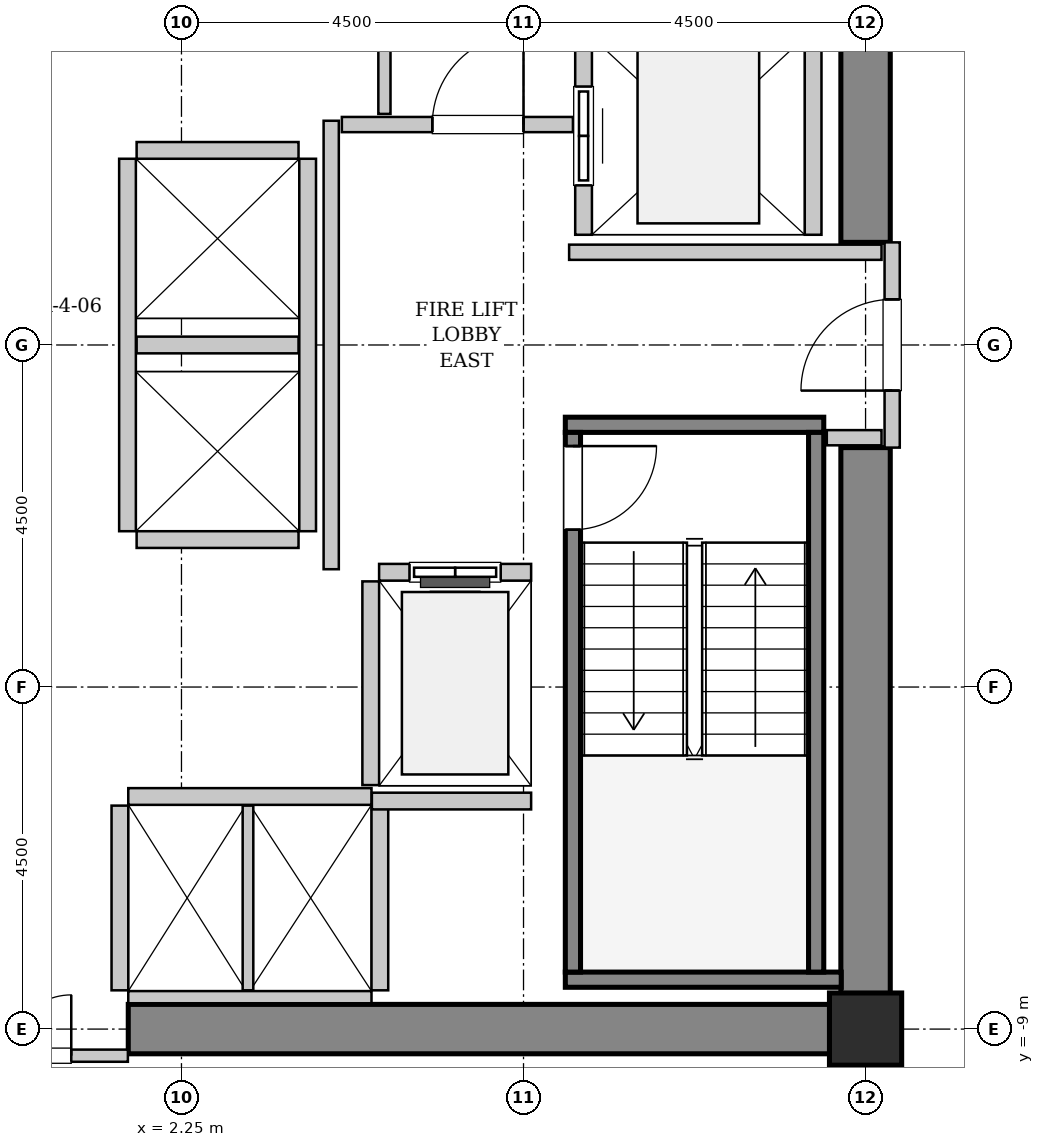
"""IFC4 building model, lengths in metres.
Left out: names, types, materials, properties, quantities, classifications, styles, units other than length and angle.
Written with IfcOpenShell. Run it as: python <this file> out.ifc"""

import sys

from ifc_helpers import new_model, si_unit, direction, frame, frame_2d, origin, origin_2d, place, context, subcontext, project, spatial, rectangle, hollow_rectangle, extrude, source, transform, mapped, element, fill, save


model = new_model("IFC4")
c1 = context("Model", 3, precision=1e-05, world=origin(), true_north=direction((0.0, 1.0)))
c2 = subcontext(c1, "Body", "Model", "MODEL_VIEW")
j1 = project(units=[si_unit("LENGTHUNIT", "METRE"), si_unit("PLANEANGLEUNIT", "RADIAN")], contexts=[c1])
p1 = place(None, origin())
s1 = spatial("IfcSite", under=j1, at=p1, CompositionType="ELEMENT")
p2 = place(p1, origin())
s2 = spatial("IfcBuilding", under=s1, at=p2, CompositionType="ELEMENT")
p3 = place(p2, frame((0.0, 0.0, 48.2)))
s3 = spatial("IfcBuildingStorey", under=s2, at=p3, CompositionType="ELEMENT", Elevation=48.2)
m1 = source(origin(), c2, "Body", "SweptSolid", [
    extrude(rectangle(XDim=10.025, YDim=0.65, at=frame_2d((5.012, 0.0))), origin(), (0.0, 0.0, 1.0), 3.8),
])
p4 = place(p3, frame((1.55, -9.0, 0.0), z_axis=(0.0, 0.0, 1.0), x_axis=(1.0, 0.0, 0.0)))
e1 = element("IfcWall", 1, at=p4, inside=s3, PredefinedType="SHEAR", context=c2, shape_type="MappedRepresentation", body=[
    mapped(m1, transform((0.0, 0.0, 0.0), x_axis=(1.0, 0.0, 0.0), y_axis=(0.0, 1.0, 0.0), z_axis=(0.0, 0.0, 1.0), scale=1.0)),
])
m2 = source(origin(), c2, "Body", "SweptSolid", [
    extrude(rectangle(XDim=7.325, YDim=0.65, at=frame_2d((3.663, 0.0))), origin(), (0.0, 0.0, 1.0), 3.8),
])
for number, where, z_axis, x_axis in (
    (2, (11.25, -8.675, 0.0), (0.0, 0.0, 1.0), (0.0, 1.0, 0.0)),
    (3, (11.25, 1.35, 0.0), (0.0, 0.0, 1.0), (0.0, 1.0, 0.0)),
):
    element("IfcWall", number, at=place(p3, frame(where, z_axis=z_axis, x_axis=x_axis)), inside=s3, PredefinedType="SHEAR", context=c2, shape_type="MappedRepresentation", body=[
        mapped(m2, transform((0.0, 0.0, 0.0), x_axis=(1.0, 0.0, 0.0), y_axis=(0.0, 1.0, 0.0), z_axis=(0.0, 0.0, 1.0), scale=1.0)),
    ])
m3 = source(origin(), c2, "Body", "SweptSolid", [
    extrude(hollow_rectangle(XDim=0.95, YDim=0.95, WallThickness=0.045, InnerFilletRadius=0.045, OuterFilletRadius=0.09, at=origin_2d()), origin(), (0.0, 0.0, 1.0), 3.8),
])
p5 = place(p3, frame((11.25, -9.0, 0.0), z_axis=(0.0, 0.0, 1.0), x_axis=(1.0, 0.0, 0.0)))
e4 = element("IfcColumn", 4, at=p5, inside=s3, PredefinedType="COLUMN", context=c2, shape_type="MappedRepresentation", body=[
    mapped(m3, transform((0.0, 0.0, 0.0), x_axis=(1.0, 0.0, 0.0), y_axis=(0.0, 1.0, 0.0), z_axis=(0.0, 0.0, 1.0), scale=1.0)),
])
m4 = source(origin(), c2, "Body", "SweptSolid", [
    extrude(rectangle(XDim=3.4, YDim=0.2, at=frame_2d((1.7, 0.0))), origin(), (0.0, 0.0, 1.0), 3.8),
])
p6 = place(p3, frame((7.3, -1.05, 0.0), z_axis=(0.0, 0.0, 1.0), x_axis=(1.0, 0.0, 0.0)))
e5 = element("IfcWall", 5, at=p6, inside=s3, PredefinedType="SOLIDWALL", context=c2, shape_type="MappedRepresentation", body=[
    mapped(m4, transform((0.0, 0.0, 0.0), x_axis=(1.0, 0.0, 0.0), y_axis=(0.0, 1.0, 0.0), z_axis=(0.0, 0.0, 1.0), scale=1.0)),
])
m5 = source(origin(), c2, "Body", "SweptSolid", [
    extrude(rectangle(XDim=3.63, YDim=0.2, at=frame_2d((1.815, 0.0))), origin(), (0.0, 0.0, 1.0), 3.8),
])
p7 = place(p3, frame((7.3, -8.35, 0.0), z_axis=(0.0, 0.0, 1.0), x_axis=(1.0, 0.0, 0.0)))
e6 = element("IfcWall", 6, at=p7, inside=s3, PredefinedType="SOLIDWALL", context=c2, shape_type="MappedRepresentation", body=[
    mapped(m5, transform((0.0, 0.0, 0.0), x_axis=(1.0, 0.0, 0.0), y_axis=(0.0, 1.0, 0.0), z_axis=(0.0, 0.0, 1.0), scale=1.0)),
])
m6 = source(origin(), c2, "Body", "SweptSolid", [
    extrude(rectangle(XDim=7.1, YDim=0.2, at=frame_2d((3.55, 0.0))), origin(), (0.0, 0.0, 1.0), 3.8),
])
p8 = place(p3, frame((7.4, -1.15, 0.0), z_axis=(0.0, 0.0, 1.0), x_axis=(0.0, -1.0, 0.0)))
e7 = element("IfcWall", 7, at=p8, inside=s3, PredefinedType="SOLIDWALL", context=c2, shape_type="MappedRepresentation", body=[
    mapped(m6, transform((0.0, 0.0, 0.0), x_axis=(1.0, 0.0, 0.0), y_axis=(0.0, 1.0, 0.0), z_axis=(0.0, 0.0, 1.0), scale=1.0)),
])
p9 = place(p8, frame((0.18, 0.0, 0.0)))
e8 = element("IfcOpeningElement", 8, at=p9, cuts=e7, PredefinedType="OPENING", context=c2, shape_type="SweptSolid", body=[
    extrude(rectangle(XDim=1.1, YDim=2.15, at=frame_2d((0.55, 1.075))), frame((0.0, 0.11, 0.0), z_axis=(0.0, -1.0, 0.0), x_axis=(1.0, 0.0, 0.0)), (0.0, 0.0, 1.0), 0.22),
])
p10 = place(p3, frame((10.6, -1.15, 0.0), z_axis=(0.0, 0.0, 1.0), x_axis=(0.0, -1.0, 0.0)))
e9 = element("IfcWall", 9, at=p10, inside=s3, PredefinedType="SOLIDWALL", context=c2, shape_type="MappedRepresentation", body=[
    mapped(m6, transform((0.0, 0.0, 0.0), x_axis=(1.0, 0.0, 0.0), y_axis=(0.0, 1.0, 0.0), z_axis=(0.0, 0.0, 1.0), scale=1.0)),
])
m7 = source(origin(), c2, "Body", "SweptSolid", [
    extrude(rectangle(XDim=2.0, YDim=0.22, at=frame_2d((1.0, 0.0))), origin(), (0.0, 0.0, 1.0), 3.535),
])
p11 = place(p3, frame((6.85, -2.99, 0.0), z_axis=(0.0, 0.0, 1.0), x_axis=(-1.0, 0.0, 0.0)))
e10 = element("IfcWall", 10, at=p11, inside=s3, PredefinedType="SOLIDWALL", context=c2, shape_type="MappedRepresentation", body=[
    mapped(m7, transform((0.0, 0.0, 0.0), x_axis=(1.0, 0.0, 0.0), y_axis=(0.0, 1.0, 0.0), z_axis=(0.0, 0.0, 1.0), scale=1.0)),
])
p12 = place(p11, frame((0.4, 0.0, 0.0)))
e11 = element("IfcOpeningElement", 11, at=p12, cuts=e10, PredefinedType="OPENING", context=c2, shape_type="SweptSolid", body=[
    extrude(rectangle(XDim=1.2, YDim=2.2, at=frame_2d((0.6, 1.1))), frame((0.0, 0.12, 0.0), z_axis=(0.0, -1.0, 0.0), x_axis=(1.0, 0.0, 0.0)), (0.0, 0.0, 1.0), 0.24),
])
m8 = source(origin(), c2, "Body", "SweptSolid", [
    extrude(rectangle(XDim=2.68, YDim=0.22, at=frame_2d((1.34, 0.0))), origin(), (0.0, 0.0, 1.0), 3.535),
])
p13 = place(p3, frame((4.74, -3.11, 0.0), z_axis=(0.0, 0.0, 1.0), x_axis=(0.0, -1.0, 0.0)))
e12 = element("IfcWall", 12, at=p13, inside=s3, PredefinedType="SOLIDWALL", context=c2, shape_type="MappedRepresentation", body=[
    mapped(m8, transform((0.0, 0.0, 0.0), x_axis=(1.0, 0.0, 0.0), y_axis=(0.0, 1.0, 0.0), z_axis=(0.0, 0.0, 1.0), scale=1.0)),
])
m9 = source(origin(), c2, "Body", "SweptSolid", [
    extrude(rectangle(XDim=5.45, YDim=0.22, at=frame_2d((2.725, 0.0))), origin(), (0.0, 0.0, 1.0), 3.535),
])
p14 = place(p3, frame((7.54, 6.9, 0.0), z_axis=(0.0, 0.0, 1.0), x_axis=(0.0, -1.0, 0.0)))
e13 = element("IfcWall", 13, at=p14, inside=s3, PredefinedType="SOLIDWALL", context=c2, shape_type="MappedRepresentation", body=[
    mapped(m9, transform((0.0, 0.0, 0.0), x_axis=(1.0, 0.0, 0.0), y_axis=(0.0, 1.0, 0.0), z_axis=(0.0, 0.0, 1.0), scale=1.0)),
])
p15 = place(p14, frame((3.5, 0.0, 0.0)))
e14 = element("IfcOpeningElement", 14, at=p15, cuts=e13, PredefinedType="OPENING", context=c2, shape_type="SweptSolid", body=[
    extrude(rectangle(XDim=1.3, YDim=2.3, at=frame_2d((0.65, 1.15))), frame((0.0, 0.12, 0.0), z_axis=(0.0, -1.0, 0.0), x_axis=(1.0, 0.0, 0.0)), (0.0, 0.0, 1.0), 0.24),
])
p16 = place(p14, frame((0.65, 0.0, 0.0)))
e15 = element("IfcOpeningElement", 15, at=p16, cuts=e13, PredefinedType="OPENING", context=c2, shape_type="SweptSolid", body=[
    extrude(rectangle(XDim=1.3, YDim=2.3, at=frame_2d((0.65, 1.15))), frame((0.0, 0.12, 0.0), z_axis=(0.0, -1.0, 0.0), x_axis=(1.0, 0.0, 0.0)), (0.0, 0.0, 1.0), 0.24),
])
p17 = place(p3, frame((10.56, 1.45, 0.0), z_axis=(0.0, 0.0, 1.0), x_axis=(0.0, 1.0, 0.0)))
e16 = element("IfcWall", 16, at=p17, inside=s3, PredefinedType="SOLIDWALL", context=c2, shape_type="MappedRepresentation", body=[
    mapped(m9, transform((0.0, 0.0, 0.0), x_axis=(1.0, 0.0, 0.0), y_axis=(0.0, 1.0, 0.0), z_axis=(0.0, 0.0, 1.0), scale=1.0)),
])
m10 = source(origin(), c2, "Body", "SweptSolid", [
    extrude(rectangle(XDim=3.2, YDim=0.22, at=frame_2d((1.6, 0.0))), origin(), (0.0, 0.0, 1.0), 3.535),
])
p18 = place(p3, frame((4.75, -5.94, 0.0), z_axis=(0.0, 0.0, 1.0), x_axis=(-1.0, 0.0, 0.0)))
e17 = element("IfcWall", 17, at=p18, inside=s3, PredefinedType="SOLIDWALL", context=c2, shape_type="MappedRepresentation", body=[
    mapped(m10, transform((0.0, 0.0, 0.0), x_axis=(1.0, 0.0, 0.0), y_axis=(0.0, 1.0, 0.0), z_axis=(0.0, 0.0, 1.0), scale=1.0)),
])
m11 = source(origin(), c2, "Body", "SweptSolid", [
    extrude(rectangle(XDim=3.2, YDim=0.16, at=frame_2d((1.6, 0.0))), origin(), (0.0, 0.0, 1.0), 2.425),
])
p19 = place(p3, frame((1.55, -8.58, 0.0), z_axis=(0.0, 0.0, 1.0), x_axis=(1.0, 0.0, 0.0)))
e18 = element("IfcWall", 18, at=p19, inside=s3, PredefinedType="PARTITIONING", context=c2, shape_type="MappedRepresentation", body=[
    mapped(m11, transform((0.0, 0.0, 0.0), x_axis=(1.0, 0.0, 0.0), y_axis=(0.0, 1.0, 0.0), z_axis=(0.0, 0.0, 1.0), scale=1.0)),
])
m12 = source(origin(), c2, "Body", "SweptSolid", [
    extrude(rectangle(XDim=2.43, YDim=0.22, at=frame_2d((1.215, 0.0))), origin(), (0.0, 0.0, 1.0), 3.535),
])
p20 = place(p3, frame((1.44, -6.06, 0.0), z_axis=(0.0, 0.0, 1.0), x_axis=(0.0, -1.0, 0.0)))
e19 = element("IfcWall", 19, at=p20, inside=s3, PredefinedType="SOLIDWALL", context=c2, shape_type="MappedRepresentation", body=[
    mapped(m12, transform((0.0, 0.0, 0.0), x_axis=(1.0, 0.0, 0.0), y_axis=(0.0, 1.0, 0.0), z_axis=(0.0, 0.0, 1.0), scale=1.0)),
])
m13 = source(origin(), c2, "Body", "SweptSolid", [
    extrude(rectangle(XDim=2.43, YDim=0.14, at=frame_2d((1.215, 0.0))), origin(), (0.0, 0.0, 1.0), 3.535),
])
p21 = place(p3, frame((3.125, -8.49, 0.0), z_axis=(0.0, 0.0, 1.0), x_axis=(0.0, 1.0, 0.0)))
e20 = element("IfcWall", 20, at=p21, inside=s3, PredefinedType="PARTITIONING", context=c2, shape_type="MappedRepresentation", body=[
    mapped(m13, transform((0.0, 0.0, 0.0), x_axis=(1.0, 0.0, 0.0), y_axis=(0.0, 1.0, 0.0), z_axis=(0.0, 0.0, 1.0), scale=1.0)),
])
p22 = place(p3, frame((4.86, -8.49, 0.0), z_axis=(0.0, 0.0, 1.0), x_axis=(0.0, 1.0, 0.0)))
e21 = element("IfcWall", 21, at=p22, inside=s3, PredefinedType="SOLIDWALL", context=c2, shape_type="MappedRepresentation", body=[
    mapped(m12, transform((0.0, 0.0, 0.0), x_axis=(1.0, 0.0, 0.0), y_axis=(0.0, 1.0, 0.0), z_axis=(0.0, 0.0, 1.0), scale=1.0)),
])
m14 = source(origin(), c2, "Body", "SweptSolid", [
    extrude(rectangle(XDim=4.9, YDim=0.22, at=frame_2d((2.45, 0.0))), origin(), (0.0, 0.0, 1.0), 3.535),
])
for number, where, z_axis, x_axis in (
    (22, (1.54, 2.45, 0.0), (0.0, 0.0, 1.0), (0.0, -1.0, 0.0)),
    (23, (3.91, -2.45, 0.0), (0.0, 0.0, 1.0), (0.0, 1.0, 0.0)),
):
    element("IfcWall", number, at=place(p3, frame(where, z_axis=z_axis, x_axis=x_axis)), inside=s3, PredefinedType="SOLIDWALL", context=c2, shape_type="MappedRepresentation", body=[
        mapped(m14, transform((0.0, 0.0, 0.0), x_axis=(1.0, 0.0, 0.0), y_axis=(0.0, 1.0, 0.0), z_axis=(0.0, 0.0, 1.0), scale=1.0)),
    ])
m15 = source(origin(), c2, "Body", "SweptSolid", [
    extrude(rectangle(XDim=2.13, YDim=0.22, at=frame_2d((1.065, 0.0))), origin(), (0.0, 0.0, 1.0), 3.535),
])
for number, where, z_axis, x_axis in (
    (24, (1.66, -2.56, 0.0), (0.0, 0.0, 1.0), (1.0, 0.0, 0.0)),
    (25, (1.66, 0.0, 0.0), (0.0, 0.0, 1.0), (1.0, 0.0, 0.0)),
    (26, (3.79, 2.56, 0.0), (0.0, 0.0, 1.0), (-1.0, 0.0, 0.0)),
):
    element("IfcWall", number, at=place(p3, frame(where, z_axis=z_axis, x_axis=x_axis)), inside=s3, PredefinedType="SOLIDWALL", context=c2, shape_type="MappedRepresentation", body=[
        mapped(m15, transform((0.0, 0.0, 0.0), x_axis=(1.0, 0.0, 0.0), y_axis=(0.0, 1.0, 0.0), z_axis=(0.0, 0.0, 1.0), scale=1.0)),
    ])
m16 = source(origin(), c2, "Body", "SweptSolid", [
    extrude(rectangle(XDim=2.095, YDim=0.22, at=frame_2d((1.048, 0.0))), origin(), (0.0, 0.0, 1.0), 3.535),
])
p23 = place(p3, frame((4.755, -6.0, 0.0), z_axis=(0.0, 0.0, 1.0), x_axis=(1.0, 0.0, 0.0)))
e27 = element("IfcWall", 27, at=p23, inside=s3, PredefinedType="SOLIDWALL", context=c2, shape_type="MappedRepresentation", body=[
    mapped(m16, transform((0.0, 0.0, 0.0), x_axis=(1.0, 0.0, 0.0), y_axis=(0.0, 1.0, 0.0), z_axis=(0.0, 0.0, 1.0), scale=1.0)),
])
m17 = source(origin(), c2, "Body", "SweptSolid", [
    extrude(rectangle(XDim=2.7, YDim=0.2, at=frame_2d((1.35, 0.0))), origin(), (0.0, 0.0, 1.0), 2.425),
])
p24 = place(p3, frame((11.6, -1.35, 0.0), z_axis=(0.0, 0.0, 1.0), x_axis=(0.0, 1.0, 0.0)))
e28 = element("IfcWall", 28, at=p24, inside=s3, PredefinedType="PARTITIONING", context=c2, shape_type="MappedRepresentation", body=[
    mapped(m17, transform((0.0, 0.0, 0.0), x_axis=(1.0, 0.0, 0.0), y_axis=(0.0, 1.0, 0.0), z_axis=(0.0, 0.0, 1.0), scale=1.0)),
])
p25 = place(p24, frame((0.75, 0.0, 0.0)))
e29 = element("IfcOpeningElement", 29, at=p25, cuts=e28, PredefinedType="OPENING", context=c2, shape_type="SweptSolid", body=[
    extrude(rectangle(XDim=1.2, YDim=2.15, at=frame_2d((0.6, 1.075))), frame((0.0, 0.11, 0.0), z_axis=(0.0, -1.0, 0.0), x_axis=(1.0, 0.0, 0.0)), (0.0, 0.0, 1.0), 0.22),
])
m18 = source(origin(), c2, "Body", "SweptSolid", [
    extrude(rectangle(XDim=5.9, YDim=0.2, at=frame_2d((2.95, 0.0))), origin(), (0.0, 0.0, 1.0), 3.535),
])
p26 = place(p3, frame((4.22, -2.95, 0.0), z_axis=(0.0, 0.0, 1.0), x_axis=(0.0, 1.0, 0.0)))
e30 = element("IfcWall", 30, at=p26, inside=s3, PredefinedType="PARTITIONING", context=c2, shape_type="MappedRepresentation", body=[
    mapped(m18, transform((0.0, 0.0, 0.0), x_axis=(1.0, 0.0, 0.0), y_axis=(0.0, 1.0, 0.0), z_axis=(0.0, 0.0, 1.0), scale=1.0)),
])
m19 = source(origin(), c2, "Body", "SweptSolid", [
    extrude(rectangle(XDim=3.04, YDim=0.2, at=frame_2d((1.52, 0.0))), origin(), (0.0, 0.0, 1.0), 3.535),
])
p27 = place(p3, frame((4.36, 2.9, 0.0), z_axis=(0.0, 0.0, 1.0), x_axis=(1.0, 0.0, 0.0)))
e31 = element("IfcWall", 31, at=p27, inside=s3, PredefinedType="PARTITIONING", context=c2, shape_type="MappedRepresentation", body=[
    mapped(m19, transform((0.0, 0.0, 0.0), x_axis=(1.0, 0.0, 0.0), y_axis=(0.0, 1.0, 0.0), z_axis=(0.0, 0.0, 1.0), scale=1.0)),
])
p28 = place(p27, frame((1.19, 0.0, 0.0)))
e32 = element("IfcOpeningElement", 32, at=p28, cuts=e31, PredefinedType="OPENING", context=c2, shape_type="SweptSolid", body=[
    extrude(rectangle(XDim=1.2, YDim=2.15, at=frame_2d((0.6, 1.075))), frame((0.0, 0.11, 0.0), z_axis=(0.0, -1.0, 0.0), x_axis=(1.0, 0.0, 0.0)), (0.0, 0.0, 1.0), 0.22),
])
m20 = source(origin(), c2, "Body", "SweptSolid", [
    extrude(rectangle(XDim=4.11, YDim=0.2, at=frame_2d((2.055, 0.0))), origin(), (0.0, 0.0, 1.0), 3.535),
])
p29 = place(p3, frame((7.35, 1.22, 0.0), z_axis=(0.0, 0.0, 1.0), x_axis=(1.0, 0.0, 0.0)))
e33 = element("IfcWall", 33, at=p29, inside=s3, PredefinedType="PARTITIONING", context=c2, shape_type="MappedRepresentation", body=[
    mapped(m20, transform((0.0, 0.0, 0.0), x_axis=(1.0, 0.0, 0.0), y_axis=(0.0, 1.0, 0.0), z_axis=(0.0, 0.0, 1.0), scale=1.0)),
])
m21 = source(origin(), c2, "Body", "SweptSolid", [
    extrude(rectangle(XDim=0.72, YDim=0.2, at=frame_2d((0.36, 0.0))), origin(), (0.0, 0.0, 1.0), 3.535),
])
p30 = place(p3, frame((10.74, -1.22, 0.0), z_axis=(0.0, 0.0, 1.0), x_axis=(1.0, 0.0, 0.0)))
e34 = element("IfcWall", 34, at=p30, inside=s3, PredefinedType="PARTITIONING", context=c2, shape_type="MappedRepresentation", body=[
    mapped(m21, transform((0.0, 0.0, 0.0), x_axis=(1.0, 0.0, 0.0), y_axis=(0.0, 1.0, 0.0), z_axis=(0.0, 0.0, 1.0), scale=1.0)),
])
m22 = source(origin(), c2, "Body", "SweptSolid", [
    extrude(rectangle(XDim=3.09, YDim=0.16, at=frame_2d((1.545, 0.0))), origin(), (0.0, 0.0, 1.0), 2.425),
])
p31 = place(p3, frame((-1.545, -9.35, 0.0), z_axis=(0.0, 0.0, 1.0), x_axis=(1.0, 0.0, 0.0)))
e35 = element("IfcWall", 35, at=p31, inside=s3, PredefinedType="PARTITIONING", context=c2, shape_type="MappedRepresentation", body=[
    mapped(m22, transform((0.0, 0.0, 0.0), x_axis=(1.0, 0.0, 0.0), y_axis=(0.0, 1.0, 0.0), z_axis=(0.0, 0.0, 1.0), scale=1.0)),
])
p32 = place(p31, frame((0.745, 0.0, 0.0)))
e36 = element("IfcOpeningElement", 36, at=p32, cuts=e35, PredefinedType="OPENING", context=c2, shape_type="SweptSolid", body=[
    extrude(rectangle(XDim=1.6, YDim=2.3, at=frame_2d((0.8, 1.15))), frame((0.0, 0.09, 0.0), z_axis=(0.0, -1.0, 0.0), x_axis=(1.0, 0.0, 0.0)), (0.0, 0.0, 1.0), 0.18),
])
m23 = source(origin(), c2, "Body", "SweptSolid", [
    extrude(rectangle(XDim=3.015, YDim=0.16, at=frame_2d((1.507, 0.0))), origin(), (0.0, 0.0, 1.0), 3.535),
])
p33 = place(p3, frame((4.92, 3.04, 0.0), z_axis=(0.0, 0.0, 1.0), x_axis=(0.0, 1.0, 0.0)))
e37 = element("IfcWall", 37, at=p33, inside=s3, PredefinedType="PARTITIONING", context=c2, shape_type="MappedRepresentation", body=[
    mapped(m23, transform((0.0, 0.0, 0.0), x_axis=(1.0, 0.0, 0.0), y_axis=(0.0, 1.0, 0.0), z_axis=(0.0, 0.0, 1.0), scale=1.0)),
])
m24 = source(origin(), c2, "Body", "SweptSolid", [
    extrude(rectangle(XDim=1.1, YDim=2.15, at=frame_2d((0.55, 1.075))), frame((0.0, 0.025, 0.0), z_axis=(0.0, -1.0, 0.0), x_axis=(1.0, 0.0, 0.0)), (0.0, 0.0, 1.0), 0.05),
])
p34 = place(p9, origin())
e38 = element("IfcDoor", 38, at=p34, inside=s3, OperationType="SINGLE_SWING_LEFT", PredefinedType="DOOR", context=c2, shape_type="MappedRepresentation", body=[
    mapped(m24, transform((0.0, 0.0, 0.0), x_axis=(1.0, 0.0, 0.0), y_axis=(0.0, 1.0, 0.0), z_axis=(0.0, 0.0, 1.0), scale=1.0)),
])
fill(e8, e38)
m25 = source(origin(), c2, "Body", "SweptSolid", [
    extrude(rectangle(XDim=1.2, YDim=2.2, at=frame_2d((0.6, 1.1))), frame((0.0, 0.025, 0.0), z_axis=(0.0, -1.0, 0.0), x_axis=(1.0, 0.0, 0.0)), (0.0, 0.0, 1.0), 0.05),
])
p35 = place(p12, origin())
e39 = element("IfcDoor", 39, at=p35, inside=s3, OperationType="SLIDING_TO_LEFT", PredefinedType="DOOR", context=c2, shape_type="MappedRepresentation", body=[
    mapped(m25, transform((0.0, 0.0, 0.0), x_axis=(1.0, 0.0, 0.0), y_axis=(0.0, 1.0, 0.0), z_axis=(0.0, 0.0, 1.0), scale=1.0)),
])
fill(e11, e39)
m26 = source(origin(), c2, "Body", "SweptSolid", [
    extrude(rectangle(XDim=1.3, YDim=2.3, at=frame_2d((0.65, 1.15))), frame((0.0, 0.025, 0.0), z_axis=(0.0, -1.0, 0.0), x_axis=(1.0, 0.0, 0.0)), (0.0, 0.0, 1.0), 0.05),
])
p36 = place(p15, origin())
e40 = element("IfcDoor", 40, at=p36, inside=s3, OperationType="SLIDING_TO_RIGHT", PredefinedType="DOOR", context=c2, shape_type="MappedRepresentation", body=[
    mapped(m26, transform((0.0, 0.0, 0.0), x_axis=(1.0, 0.0, 0.0), y_axis=(0.0, 1.0, 0.0), z_axis=(0.0, 0.0, 1.0), scale=1.0)),
])
fill(e14, e40)
m27 = source(origin(), c2, "Body", "SweptSolid", [
    extrude(rectangle(XDim=1.2, YDim=2.15, at=frame_2d((0.6, 1.075))), frame((0.0, 0.025, 0.0), z_axis=(0.0, -1.0, 0.0), x_axis=(1.0, 0.0, 0.0)), (0.0, 0.0, 1.0), 0.05),
])
p37 = place(p25, origin())
e41 = element("IfcDoor", 41, at=p37, inside=s3, OperationType="SINGLE_SWING_LEFT", PredefinedType="DOOR", context=c2, shape_type="MappedRepresentation", body=[
    mapped(m27, transform((0.0, 0.0, 0.0), x_axis=(1.0, 0.0, 0.0), y_axis=(0.0, 1.0, 0.0), z_axis=(0.0, 0.0, 1.0), scale=1.0)),
])
fill(e29, e41)
p38 = place(p28, origin())
e42 = element("IfcDoor", 42, at=p38, inside=s3, OperationType="SINGLE_SWING_RIGHT", PredefinedType="DOOR", context=c2, shape_type="MappedRepresentation", body=[
    mapped(m27, transform((0.0, 0.0, 0.0), x_axis=(1.0, 0.0, 0.0), y_axis=(0.0, 1.0, 0.0), z_axis=(0.0, 0.0, 1.0), scale=1.0)),
])
fill(e32, e42)
m28 = source(origin(), c2, "Body", "SweptSolid", [
    extrude(rectangle(XDim=1.6, YDim=2.3, at=frame_2d((0.8, 1.15))), frame((0.0, 0.025, 0.0), z_axis=(0.0, -1.0, 0.0), x_axis=(1.0, 0.0, 0.0)), (0.0, 0.0, 1.0), 0.05),
])
p39 = place(p32, origin())
e43 = element("IfcDoor", 43, at=p39, inside=s3, OperationType="DOUBLE_DOOR_SINGLE_SWING", PredefinedType="DOOR", context=c2, shape_type="MappedRepresentation", body=[
    mapped(m28, transform((0.0, 0.0, 0.0), x_axis=(1.0, 0.0, 0.0), y_axis=(0.0, 1.0, 0.0), z_axis=(0.0, 0.0, 1.0), scale=1.0)),
])
fill(e36, e43)
save(model, sys.argv[1])
